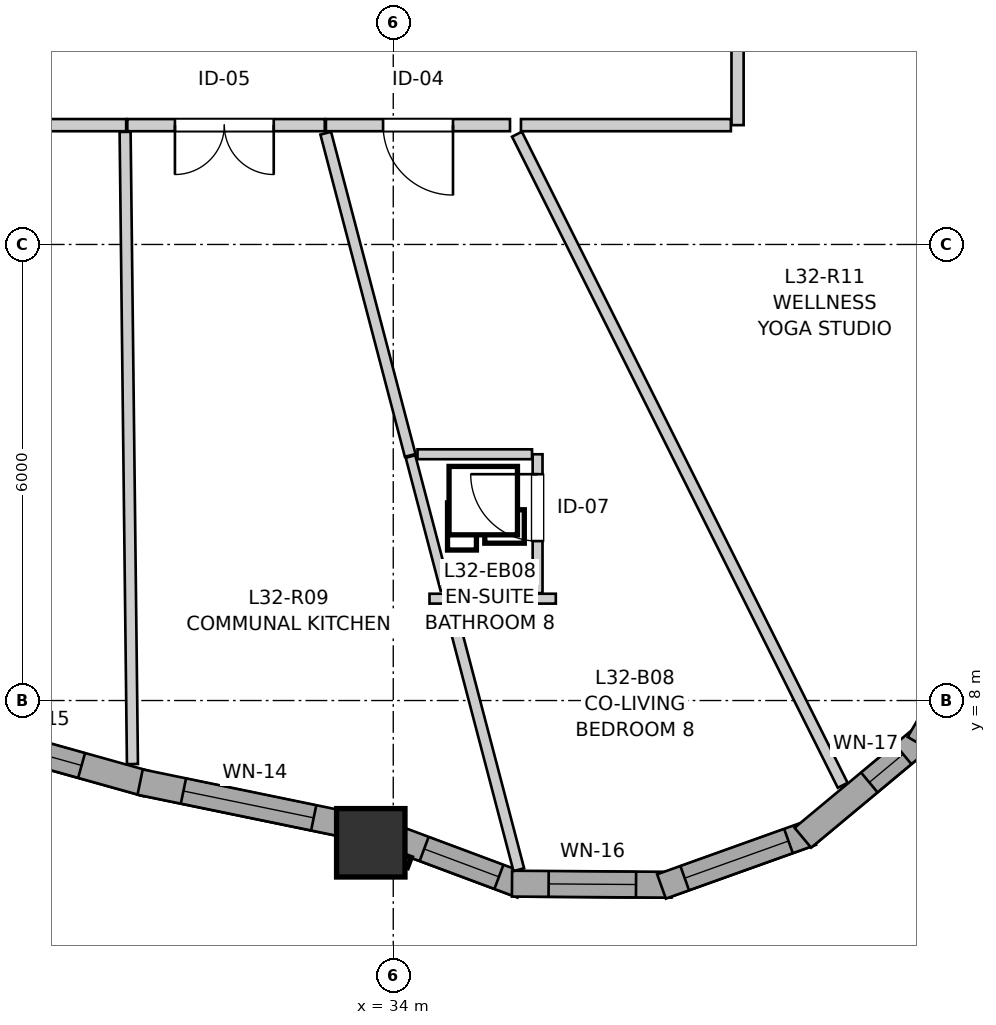
"""IFC4 building model, lengths in metres.
Left out: names, types, materials, properties, quantities, classifications, styles, units other than length and angle.
Written with IfcOpenShell. Run it as: python <this file> out.ifc"""

import sys

from ifc_helpers import new_model, si_unit, direction, frame, frame_2d, origin, origin_2d, place, context, subcontext, project, spatial, rectangle, extrude, source, transform, mapped, element, fill, save


model = new_model("IFC4")
c1 = context("Model", 3, precision=1e-05, world=origin(), true_north=direction((0.0, 1.0)))
c2 = subcontext(c1, "Body", "Model", "MODEL_VIEW")
j1 = project(units=[si_unit("LENGTHUNIT", "METRE"), si_unit("PLANEANGLEUNIT", "RADIAN")], contexts=[c1])
p1 = place(None, origin())
s1 = spatial("IfcSite", under=j1, at=p1, CompositionType="ELEMENT")
p2 = place(p1, origin())
s2 = spatial("IfcBuilding", under=s1, at=p2, CompositionType="ELEMENT")
p3 = place(p2, frame((0.0, 0.0, 108.8)))
s3 = spatial("IfcBuildingStorey", under=s2, at=p3, CompositionType="ELEMENT", Elevation=108.8)
m1 = source(origin(), c2, "Body", "SweptSolid", [
    extrude(rectangle(XDim=0.9, YDim=0.9, at=origin_2d()), origin(), (0.0, 0.0, 1.0), 2.935),
])
p4 = place(p3, frame((33.704, 6.128, 0.0), z_axis=(0.0, 0.0, 1.0), x_axis=(1.0, 0.0, 0.0)))
e1 = element("IfcColumn", 1, at=p4, inside=s3, PredefinedType="COLUMN", context=c2, shape_type="MappedRepresentation", body=[
    mapped(m1, transform((0.0, 0.0, 0.0), x_axis=(1.0, 0.0, 0.0), y_axis=(0.0, 1.0, 0.0), z_axis=(0.0, 0.0, 1.0), scale=1.0)),
])
p5 = place(p3, frame((27.819, 7.728, 0.0), z_axis=(0.0, 0.0, 1.0), x_axis=(0.963032186905, -0.269386352632, 0.0)))
e2 = element("IfcWall", 2, at=p5, inside=s3, PredefinedType="SOLIDWALL", context=c2, shape_type="SweptSolid", body=[
    extrude(rectangle(XDim=3.049, YDim=0.34, at=frame_2d((1.524, 0.0))), origin(), (0.0, 0.0, 1.0), 2.465),
])
p6 = place(p5, frame((0.71, 0.0, 0.82)))
e3 = element("IfcOpeningElement", 3, at=p6, cuts=e2, PredefinedType="OPENING", context=c2, shape_type="SweptSolid", body=[
    extrude(rectangle(XDim=1.45, YDim=1.25, at=frame_2d((0.725, 0.625))), frame((0.0, 0.18, 0.0), z_axis=(0.0, -1.0, 0.0), x_axis=(1.0, 0.0, 0.0)), (0.0, 0.0, 1.0), 0.36),
])
p7 = place(p3, frame((30.67, 6.927, 0.0), z_axis=(0.0, 0.0, 1.0), x_axis=(0.979422345081, -0.201821381317, 0.0)))
e4 = element("IfcWall", 4, at=p7, inside=s3, PredefinedType="SOLIDWALL", context=c2, shape_type="SweptSolid", body=[
    extrude(rectangle(XDim=2.903, YDim=0.34, at=frame_2d((1.452, 0.0))), origin(), (0.0, 0.0, 1.0), 2.465),
])
p8 = place(p7, frame((0.582, 0.0, 0.82)))
e5 = element("IfcOpeningElement", 5, at=p8, cuts=e4, PredefinedType="OPENING", context=c2, shape_type="SweptSolid", body=[
    extrude(rectangle(XDim=1.75, YDim=1.3, at=frame_2d((0.875, 0.65))), frame((0.0, 0.18, 0.0), z_axis=(0.0, -1.0, 0.0), x_axis=(1.0, 0.0, 0.0)), (0.0, 0.0, 1.0), 0.36),
])
p9 = place(p3, frame((33.979, 6.207, 0.0), z_axis=(0.0, 0.0, 1.0), x_axis=(0.936799566991, -0.349866504951, 0.0)))
e6 = element("IfcWall", 6, at=p9, inside=s3, PredefinedType="SOLIDWALL", context=c2, shape_type="SweptSolid", body=[
    extrude(rectangle(XDim=1.831, YDim=0.34, at=frame_2d((0.916, 0.0))), origin(), (0.0, 0.0, 1.0), 2.465),
])
p10 = place(p9, frame((0.456, 0.0, 0.82)))
e7 = element("IfcOpeningElement", 7, at=p10, cuts=e6, PredefinedType="OPENING", context=c2, shape_type="SweptSolid", body=[
    extrude(rectangle(XDim=1.05, YDim=1.45, at=frame_2d((0.525, 0.725))), frame((0.0, 0.18, 0.0), z_axis=(0.0, -1.0, 0.0), x_axis=(1.0, 0.0, 0.0)), (0.0, 0.0, 1.0), 0.36),
])
p11 = place(p3, frame((35.562, 5.591, 0.0), z_axis=(0.0, 0.0, 1.0), x_axis=(0.999976456891, -0.00686189939, 0.0)))
e8 = element("IfcWall", 8, at=p11, inside=s3, PredefinedType="SOLIDWALL", context=c2, shape_type="SweptSolid", body=[
    extrude(rectangle(XDim=2.099, YDim=0.34, at=frame_2d((1.05, 0.0))), origin(), (0.0, 0.0, 1.0), 2.465),
])
p12 = place(p11, frame((0.482, 0.0, 0.82)))
e9 = element("IfcOpeningElement", 9, at=p12, cuts=e8, PredefinedType="OPENING", context=c2, shape_type="SweptSolid", body=[
    extrude(rectangle(XDim=1.15, YDim=1.2, at=frame_2d((0.575, 0.6))), frame((0.0, 0.18, 0.0), z_axis=(0.0, -1.0, 0.0), x_axis=(1.0, 0.0, 0.0)), (0.0, 0.0, 1.0), 0.36),
])
p13 = place(p3, frame((37.529, 5.554, 0.0), z_axis=(0.0, 0.0, 1.0), x_axis=(0.941486401639, 0.33705096874, 0.0)))
e10 = element("IfcWall", 10, at=p13, inside=s3, PredefinedType="SOLIDWALL", context=c2, shape_type="SweptSolid", body=[
    extrude(rectangle(XDim=2.099, YDim=0.34, at=frame_2d((1.05, 0.0))), origin(), (0.0, 0.0, 1.0), 2.465),
])
p14 = place(p13, frame((0.324, 0.0, 0.82)))
e11 = element("IfcOpeningElement", 11, at=p14, cuts=e10, PredefinedType="OPENING", context=c2, shape_type="SweptSolid", body=[
    extrude(rectangle(XDim=1.45, YDim=1.25, at=frame_2d((0.725, 0.625))), frame((0.0, 0.18, 0.0), z_axis=(0.0, -1.0, 0.0), x_axis=(1.0, 0.0, 0.0)), (0.0, 0.0, 1.0), 0.36),
])
p15 = place(p3, frame((39.389, 6.195, 0.0), z_axis=(0.0, 0.0, 1.0), x_axis=(0.768488123124, 0.639864051669, 0.0)))
e12 = element("IfcWall", 12, at=p15, inside=s3, PredefinedType="SOLIDWALL", context=c2, shape_type="SweptSolid", body=[
    extrude(rectangle(XDim=2.099, YDim=0.34, at=frame_2d((1.05, 0.0))), origin(), (0.0, 0.0, 1.0), 2.465),
])
p16 = place(p15, frame((1.138, 0.0, 0.82)))
e13 = element("IfcOpeningElement", 13, at=p16, cuts=e12, PredefinedType="OPENING", context=c2, shape_type="SweptSolid", body=[
    extrude(rectangle(XDim=0.58, YDim=1.35, at=frame_2d((0.29, 0.675))), frame((0.0, 0.18, 0.0), z_axis=(0.0, -1.0, 0.0), x_axis=(1.0, 0.0, 0.0)), (0.0, 0.0, 1.0), 0.36),
])
p17 = place(p3, frame((40.916, 7.435, 0.0), z_axis=(0.0, 0.0, 1.0), x_axis=(0.501989603552, 0.864873654313, 0.0)))
e14 = element("IfcWall", 14, at=p17, inside=s3, PredefinedType="SOLIDWALL", context=c2, shape_type="SweptSolid", body=[
    extrude(rectangle(XDim=2.099, YDim=0.34, at=frame_2d((1.05, 0.0))), origin(), (0.0, 0.0, 1.0), 2.465),
])
p18 = place(p17, frame((0.3, 0.0, 0.82)))
e15 = element("IfcOpeningElement", 15, at=p18, cuts=e14, PredefinedType="OPENING", context=c2, shape_type="SweptSolid", body=[
    extrude(rectangle(XDim=1.5, YDim=1.45, at=frame_2d((0.75, 0.725))), frame((0.0, 0.18, 0.0), z_axis=(0.0, -1.0, 0.0), x_axis=(1.0, 0.0, 0.0)), (0.0, 0.0, 1.0), 0.36),
])
p19 = place(p3, frame((30.486, 15.57, 0.0), z_axis=(0.0, 0.0, 1.0), x_axis=(-1.0, 0.0, 0.0)))
e16 = element("IfcWall", 16, at=p19, inside=s3, PredefinedType="PARTITIONING", context=c2, shape_type="SweptSolid", body=[
    extrude(rectangle(XDim=6.725, YDim=0.16, at=frame_2d((3.363, 0.0))), origin(), (0.0, 0.0, 1.0), 2.935),
])
p20 = place(p19, frame((2.711, 0.0, 0.0)))
e17 = element("IfcOpeningElement", 17, at=p20, cuts=e16, PredefinedType="OPENING", context=c2, shape_type="SweptSolid", body=[
    extrude(rectangle(XDim=1.3, YDim=2.1, at=frame_2d((0.65, 1.05))), frame((0.0, 0.09, 0.0), z_axis=(0.0, -1.0, 0.0), x_axis=(1.0, 0.0, 0.0)), (0.0, 0.0, 1.0), 0.18),
])
p21 = place(p3, frame((38.53, 21.863, 0.0), z_axis=(0.0, 0.0, 1.0), x_axis=(0.0, -1.0, 0.0)))
e18 = element("IfcWall", 18, at=p21, inside=s3, PredefinedType="PARTITIONING", context=c2, shape_type="SweptSolid", body=[
    extrude(rectangle(XDim=6.293, YDim=0.16, at=frame_2d((3.146, 0.0))), origin(), (0.0, 0.0, 1.0), 2.935),
])
p22 = place(p21, frame((2.675, 0.0, 0.0)))
e19 = element("IfcOpeningElement", 19, at=p22, cuts=e18, PredefinedType="OPENING", context=c2, shape_type="SweptSolid", body=[
    extrude(rectangle(XDim=0.96, YDim=2.1, at=frame_2d((0.48, 1.05))), frame((0.0, 0.09, 0.0), z_axis=(0.0, -1.0, 0.0), x_axis=(1.0, 0.0, 0.0)), (0.0, 0.0, 1.0), 0.18),
])
p23 = place(p3, frame((33.099, 15.57, 0.0), z_axis=(0.0, 0.0, 1.0), x_axis=(-1.0, 0.0, 0.0)))
e20 = element("IfcWall", 20, at=p23, inside=s3, PredefinedType="PARTITIONING", context=c2, shape_type="SweptSolid", body=[
    extrude(rectangle(XDim=2.598, YDim=0.16, at=frame_2d((1.299, 0.0))), origin(), (0.0, 0.0, 1.0), 2.935),
])
p24 = place(p23, frame((0.671, 0.0, 0.0)))
e21 = element("IfcOpeningElement", 21, at=p24, cuts=e20, PredefinedType="OPENING", context=c2, shape_type="SweptSolid", body=[
    extrude(rectangle(XDim=1.3, YDim=2.1, at=frame_2d((0.65, 1.05))), frame((0.0, 0.09, 0.0), z_axis=(0.0, -1.0, 0.0), x_axis=(1.0, 0.0, 0.0)), (0.0, 0.0, 1.0), 0.18),
])
p25 = place(p3, frame((35.536, 15.57, 0.0), z_axis=(0.0, 0.0, 1.0), x_axis=(-1.0, 0.0, 0.0)))
e22 = element("IfcWall", 22, at=p25, inside=s3, PredefinedType="PARTITIONING", context=c2, shape_type="SweptSolid", body=[
    extrude(rectangle(XDim=2.422, YDim=0.16, at=frame_2d((1.211, 0.0))), origin(), (0.0, 0.0, 1.0), 2.935),
])
p26 = place(p25, frame((0.75, 0.0, 0.0)))
e23 = element("IfcOpeningElement", 23, at=p26, cuts=e22, PredefinedType="OPENING", context=c2, shape_type="SweptSolid", body=[
    extrude(rectangle(XDim=0.92, YDim=2.1, at=frame_2d((0.46, 1.05))), frame((0.0, 0.09, 0.0), z_axis=(0.0, -1.0, 0.0), x_axis=(1.0, 0.0, 0.0)), (0.0, 0.0, 1.0), 0.18),
])
p27 = place(p3, frame((35.899, 9.413, 0.0), z_axis=(0.0, 0.0, 1.0), x_axis=(0.0, 1.0, 0.0)))
e24 = element("IfcWall", 24, at=p27, inside=s3, PredefinedType="PARTITIONING", context=c2, shape_type="SweptSolid", body=[
    extrude(rectangle(XDim=1.827, YDim=0.13, at=frame_2d((0.914, 0.0))), origin(), (0.0, 0.0, 1.0), 2.935),
])
p28 = place(p27, frame((0.685, 0.0, 0.0)))
e25 = element("IfcOpeningElement", 25, at=p28, cuts=e24, PredefinedType="OPENING", context=c2, shape_type="SweptSolid", body=[
    extrude(rectangle(XDim=0.88, YDim=2.05, at=frame_2d((0.44, 1.025))), frame((0.0, 0.075, 0.0), z_axis=(0.0, -1.0, 0.0), x_axis=(1.0, 0.0, 0.0)), (0.0, 0.0, 1.0), 0.15),
])
p29 = place(p3, frame((35.628, 15.45, 0.0), z_axis=(0.0, 0.0, 1.0), x_axis=(0.447427687311, -0.894320113062, 0.0)))
e26 = element("IfcWall", 26, at=p29, inside=s3, PredefinedType="PARTITIONING", context=c2, shape_type="SweptSolid", body=[
    extrude(rectangle(XDim=9.578, YDim=0.145, at=frame_2d((4.789, 0.0))), origin(), (0.0, 0.0, 1.0), 2.935),
])
p30 = place(p3, frame((30.472, 15.481, 0.0), z_axis=(0.0, 0.0, 1.0), x_axis=(0.011623708307, -0.999932442421, 0.0)))
e27 = element("IfcWall", 27, at=p30, inside=s3, PredefinedType="PARTITIONING", context=c2, shape_type="SweptSolid", body=[
    extrude(rectangle(XDim=8.317, YDim=0.145, at=frame_2d((4.159, 0.0))), origin(), (0.0, 0.0, 1.0), 2.935),
])
p31 = place(p3, frame((33.112, 15.464, 0.0), z_axis=(0.0, 0.0, 1.0), x_axis=(0.253558008984, -0.967320182814, 0.0)))
e28 = element("IfcWall", 28, at=p31, inside=s3, PredefinedType="PARTITIONING", context=c2, shape_type="SweptSolid", body=[
    extrude(rectangle(XDim=4.382, YDim=0.145, at=frame_2d((2.191, 0.0))), origin(), (0.0, 0.0, 1.0), 2.935),
])
p32 = place(p3, frame((34.737, 9.264, 0.0), z_axis=(0.0, 0.0, 1.0), x_axis=(0.253650405993, -0.967295958608, 0.0)))
e29 = element("IfcWall", 29, at=p32, inside=s3, PredefinedType="PARTITIONING", context=c2, shape_type="SweptSolid", body=[
    extrude(rectangle(XDim=3.607, YDim=0.145, at=frame_2d((1.804, 0.0))), origin(), (0.0, 0.0, 1.0), 2.935),
])
p33 = place(p3, frame((35.68, 15.57, 0.0), z_axis=(0.0, 0.0, 1.0), x_axis=(1.0, 0.0, 0.0)))
e30 = element("IfcWall", 30, at=p33, inside=s3, PredefinedType="PARTITIONING", context=c2, shape_type="SweptSolid", body=[
    extrude(rectangle(XDim=2.762, YDim=0.16, at=frame_2d((1.381, 0.0))), origin(), (0.0, 0.0, 1.0), 2.935),
])
p34 = place(p3, frame((34.227, 11.21, 0.0), z_axis=(0.0, 0.0, 1.0), x_axis=(0.2534645297, -0.967344681168, 0.0)))
e31 = element("IfcWall", 31, at=p34, inside=s3, PredefinedType="PARTITIONING", context=c2, shape_type="SweptSolid", body=[
    extrude(rectangle(XDim=1.811, YDim=0.13, at=frame_2d((0.905, 0.0))), origin(), (0.0, 0.0, 1.0), 2.935),
])
p35 = place(p3, frame((34.319, 11.24, 0.0), z_axis=(0.0, 0.0, 1.0), x_axis=(1.0, 0.0, 0.0)))
e32 = element("IfcWall", 32, at=p35, inside=s3, PredefinedType="PARTITIONING", context=c2, shape_type="SweptSolid", body=[
    extrude(rectangle(XDim=1.507, YDim=0.13, at=frame_2d((0.753, 0.0))), origin(), (0.0, 0.0, 1.0), 2.935),
])
p36 = place(p3, frame((34.477, 9.34, 0.0), z_axis=(0.0, 0.0, 1.0), x_axis=(1.0, 0.0, 0.0)))
e33 = element("IfcWall", 33, at=p36, inside=s3, PredefinedType="PARTITIONING", context=c2, shape_type="SweptSolid", body=[
    extrude(rectangle(XDim=1.662, YDim=0.13, at=frame_2d((0.831, 0.0))), origin(), (0.0, 0.0, 1.0), 2.935),
])
m2 = source(origin(), c2, "Body", "SweptSolid", [
    extrude(rectangle(XDim=1.45, YDim=1.25, at=frame_2d((0.725, 0.625))), frame((0.0, 0.03, 0.0), z_axis=(0.0, -1.0, 0.0), x_axis=(1.0, 0.0, 0.0)), (0.0, 0.0, 1.0), 0.06),
])
p37 = place(p6, origin())
e34 = element("IfcWindow", 34, at=p37, inside=s3, PartitioningType="SINGLE_PANEL", PredefinedType="WINDOW", context=c2, shape_type="MappedRepresentation", body=[
    mapped(m2, transform((0.0, 0.0, 0.0), x_axis=(1.0, 0.0, 0.0), y_axis=(0.0, 1.0, 0.0), z_axis=(0.0, 0.0, 1.0), scale=1.0)),
])
fill(e3, e34)
m3 = source(origin(), c2, "Body", "SweptSolid", [
    extrude(rectangle(XDim=1.75, YDim=1.3, at=frame_2d((0.875, 0.65))), frame((0.0, 0.03, 0.0), z_axis=(0.0, -1.0, 0.0), x_axis=(1.0, 0.0, 0.0)), (0.0, 0.0, 1.0), 0.06),
])
p38 = place(p8, origin())
e35 = element("IfcWindow", 35, at=p38, inside=s3, PartitioningType="SINGLE_PANEL", PredefinedType="WINDOW", context=c2, shape_type="MappedRepresentation", body=[
    mapped(m3, transform((0.0, 0.0, 0.0), x_axis=(1.0, 0.0, 0.0), y_axis=(0.0, 1.0, 0.0), z_axis=(0.0, 0.0, 1.0), scale=1.0)),
])
fill(e5, e35)
m4 = source(origin(), c2, "Body", "SweptSolid", [
    extrude(rectangle(XDim=1.05, YDim=1.45, at=frame_2d((0.525, 0.725))), frame((0.0, 0.03, 0.0), z_axis=(0.0, -1.0, 0.0), x_axis=(1.0, 0.0, 0.0)), (0.0, 0.0, 1.0), 0.06),
])
p39 = place(p10, origin())
e36 = element("IfcWindow", 36, at=p39, inside=s3, PartitioningType="SINGLE_PANEL", PredefinedType="WINDOW", context=c2, shape_type="MappedRepresentation", body=[
    mapped(m4, transform((0.0, 0.0, 0.0), x_axis=(1.0, 0.0, 0.0), y_axis=(0.0, 1.0, 0.0), z_axis=(0.0, 0.0, 1.0), scale=1.0)),
])
fill(e7, e36)
m5 = source(origin(), c2, "Body", "SweptSolid", [
    extrude(rectangle(XDim=1.15, YDim=1.2, at=frame_2d((0.575, 0.6))), frame((0.0, 0.03, 0.0), z_axis=(0.0, -1.0, 0.0), x_axis=(1.0, 0.0, 0.0)), (0.0, 0.0, 1.0), 0.06),
])
p40 = place(p12, origin())
e37 = element("IfcWindow", 37, at=p40, inside=s3, PartitioningType="SINGLE_PANEL", PredefinedType="WINDOW", context=c2, shape_type="MappedRepresentation", body=[
    mapped(m5, transform((0.0, 0.0, 0.0), x_axis=(1.0, 0.0, 0.0), y_axis=(0.0, 1.0, 0.0), z_axis=(0.0, 0.0, 1.0), scale=1.0)),
])
fill(e9, e37)
p41 = place(p14, origin())
e38 = element("IfcWindow", 38, at=p41, inside=s3, PartitioningType="SINGLE_PANEL", PredefinedType="WINDOW", context=c2, shape_type="MappedRepresentation", body=[
    mapped(m2, transform((0.0, 0.0, 0.0), x_axis=(1.0, 0.0, 0.0), y_axis=(0.0, 1.0, 0.0), z_axis=(0.0, 0.0, 1.0), scale=1.0)),
])
fill(e11, e38)
m6 = source(origin(), c2, "Body", "SweptSolid", [
    extrude(rectangle(XDim=0.58, YDim=1.35, at=frame_2d((0.29, 0.675))), frame((0.0, 0.03, 0.0), z_axis=(0.0, -1.0, 0.0), x_axis=(1.0, 0.0, 0.0)), (0.0, 0.0, 1.0), 0.06),
])
p42 = place(p16, origin())
e39 = element("IfcWindow", 39, at=p42, inside=s3, PartitioningType="SINGLE_PANEL", PredefinedType="WINDOW", context=c2, shape_type="MappedRepresentation", body=[
    mapped(m6, transform((0.0, 0.0, 0.0), x_axis=(1.0, 0.0, 0.0), y_axis=(0.0, 1.0, 0.0), z_axis=(0.0, 0.0, 1.0), scale=1.0)),
])
fill(e13, e39)
m7 = source(origin(), c2, "Body", "SweptSolid", [
    extrude(rectangle(XDim=1.3, YDim=2.1, at=frame_2d((0.65, 1.05))), frame((0.0, 0.025, 0.0), z_axis=(0.0, -1.0, 0.0), x_axis=(1.0, 0.0, 0.0)), (0.0, 0.0, 1.0), 0.05),
])
p43 = place(p24, origin())
e40 = element("IfcDoor", 40, at=p43, inside=s3, OperationType="DOUBLE_DOOR_SINGLE_SWING", PredefinedType="DOOR", context=c2, shape_type="MappedRepresentation", body=[
    mapped(m7, transform((0.0, 0.0, 0.0), x_axis=(1.0, 0.0, 0.0), y_axis=(0.0, 1.0, 0.0), z_axis=(0.0, 0.0, 1.0), scale=1.0)),
])
fill(e21, e40)
m8 = source(origin(), c2, "Body", "SweptSolid", [
    extrude(rectangle(XDim=0.92, YDim=2.1, at=frame_2d((0.46, 1.05))), frame((0.0, 0.025, 0.0), z_axis=(0.0, -1.0, 0.0), x_axis=(1.0, 0.0, 0.0)), (0.0, 0.0, 1.0), 0.05),
])
p44 = place(p26, origin())
e41 = element("IfcDoor", 41, at=p44, inside=s3, OperationType="SINGLE_SWING_LEFT", PredefinedType="DOOR", context=c2, shape_type="MappedRepresentation", body=[
    mapped(m8, transform((0.0, 0.0, 0.0), x_axis=(1.0, 0.0, 0.0), y_axis=(0.0, 1.0, 0.0), z_axis=(0.0, 0.0, 1.0), scale=1.0)),
])
fill(e23, e41)
m9 = source(origin(), c2, "Body", "SweptSolid", [
    extrude(rectangle(XDim=0.88, YDim=2.05, at=frame_2d((0.44, 1.025))), frame((0.0, 0.025, 0.0), z_axis=(0.0, -1.0, 0.0), x_axis=(1.0, 0.0, 0.0)), (0.0, 0.0, 1.0), 0.05),
])
p45 = place(p28, origin())
e42 = element("IfcDoor", 42, at=p45, inside=s3, OperationType="SINGLE_SWING_RIGHT", PredefinedType="DOOR", context=c2, shape_type="MappedRepresentation", body=[
    mapped(m9, transform((0.0, 0.0, 0.0), x_axis=(1.0, 0.0, 0.0), y_axis=(0.0, 1.0, 0.0), z_axis=(0.0, 0.0, 1.0), scale=1.0)),
])
fill(e25, e42)
save(model, sys.argv[1])
